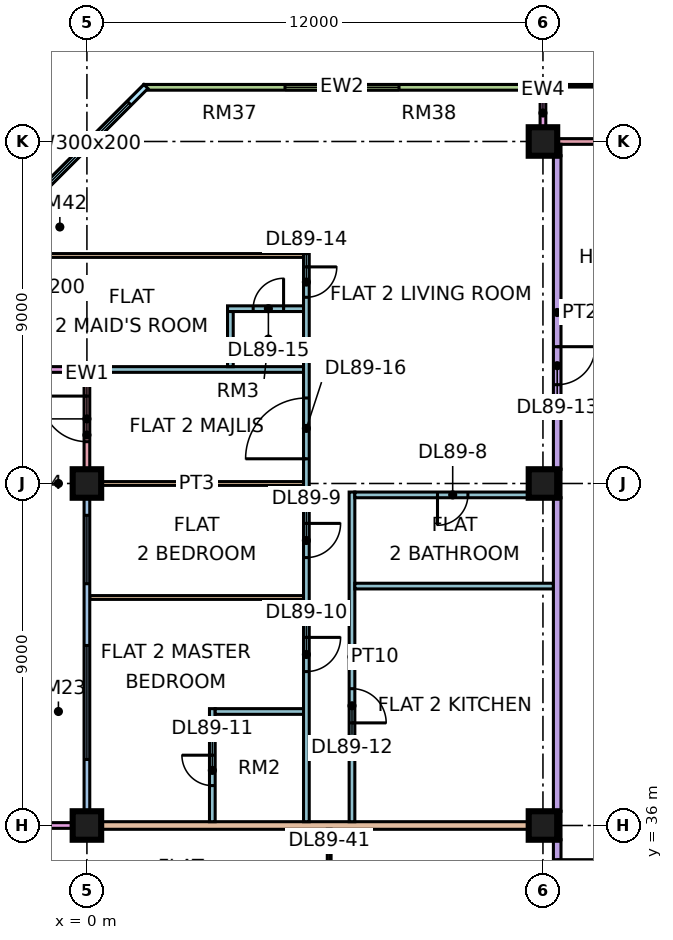
"""IFC4 building model, lengths in metres.
Left out: names, types, materials, properties, quantities, classifications, styles, units other than length and angle.
Written with IfcOpenShell. Run it as: python <this file> out.ifc"""

import sys

from ifc_helpers import new_model, si_unit, direction, frame, frame_2d, origin, origin_2d, place, context, subcontext, project, spatial, rectangle, extrude, element, fill, save


model = new_model("IFC4")
c1 = context("Model", 3, precision=1e-05, world=origin(), true_north=direction((0.0, 1.0)))
c2 = subcontext(c1, "Body", "Model", "MODEL_VIEW")
j1 = project(units=[si_unit("LENGTHUNIT", "METRE"), si_unit("PLANEANGLEUNIT", "RADIAN")], contexts=[c1])
p1 = place(None, origin())
s1 = spatial("IfcSite", under=j1, at=p1, CompositionType="ELEMENT")
p2 = place(p1, origin())
s2 = spatial("IfcBuilding", under=s1, at=p2, CompositionType="ELEMENT")
p3 = place(p2, frame((0.0, 0.0, 380.15)))
s3 = spatial("IfcBuildingStorey", under=s2, at=p3, CompositionType="ELEMENT", Elevation=380.15)
p4 = place(p3, frame((0.0, 36.0, 0.0), z_axis=(0.0, 0.0, 1.0), x_axis=(1.0, 0.0, 0.0)))
e1 = element("IfcColumn", 1, at=p4, inside=s3, PredefinedType="COLUMN", context=c2, shape_type="SweptSolid", body=[
    extrude(rectangle(XDim=0.75, YDim=0.75, at=origin_2d()), origin(), (0.0, 0.0, 1.0), 3.75),
])
for number, where, z_axis, x_axis in (
    (2, (0.0, 45.0, 0.0), (0.0, 0.0, 1.0), (1.0, 0.0, 0.0)),
    (3, (12.0, 36.0, 0.0), (0.0, 0.0, 1.0), (1.0, 0.0, 0.0)),
    (4, (12.0, 45.0, 0.0), (0.0, 0.0, 1.0), (1.0, 0.0, 0.0)),
    (5, (12.0, 54.0, 0.0), (0.0, 0.0, 1.0), (1.0, 0.0, 0.0)),
):
    element("IfcColumn", number, at=place(p3, frame(where, z_axis=z_axis, x_axis=x_axis)), inside=s3, PredefinedType="COLUMN", context=c2, shape_type="SweptSolid", body=[
        extrude(rectangle(XDim=0.75, YDim=0.75, at=origin_2d()), origin(), (0.0, 0.0, 1.0), 3.75),
    ])
p5 = place(p3, frame((22.425, 54.0, 0.0), z_axis=(0.0, 0.0, 1.0), x_axis=(-1.0, 0.0, 0.0)))
e6 = element("IfcWall", 6, at=p5, inside=s3, PredefinedType="SOLIDWALL", context=c2, shape_type="SweptSolid", body=[
    extrude(rectangle(XDim=10.35, YDim=0.15, at=frame_2d((5.175, 0.0))), origin(), (0.0, 0.0, 1.0), 3.3),
])
p6 = place(p5, frame((1.012, 0.0, 0.45)))
e7 = element("IfcOpeningElement", 7, at=p6, cuts=e6, PredefinedType="OPENING", context=c2, shape_type="SweptSolid", body=[
    extrude(rectangle(XDim=4.8, YDim=2.0, at=frame_2d((2.4, 1.0))), frame((0.0, 0.085, 0.0), z_axis=(0.0, -1.0, 0.0), x_axis=(1.0, 0.0, 0.0)), (0.0, 0.0, 1.0), 0.17),
])
p7 = place(p3, frame((12.0, 55.5, 0.0), z_axis=(0.0, 0.0, 1.0), x_axis=(0.0, -1.0, 0.0)))
e8 = element("IfcWall", 8, at=p7, inside=s3, PredefinedType="SOLIDWALL", context=c2, shape_type="SweptSolid", body=[
    extrude(rectangle(XDim=1.5, YDim=0.15, at=frame_2d((0.75, 0.0))), origin(), (0.0, 0.0, 1.0), 3.3),
])
p8 = place(p3, frame((11.925, 55.425, 0.0), z_axis=(0.0, 0.0, 1.0), x_axis=(-1.0, 0.0, 0.0)))
e9 = element("IfcWall", 9, at=p8, inside=s3, PredefinedType="SOLIDWALL", context=c2, shape_type="SweptSolid", body=[
    extrude(rectangle(XDim=10.425, YDim=0.15, at=frame_2d((5.212, 0.0))), origin(), (0.0, 0.0, 1.0), 3.3),
])
p9 = place(p8, frame((3.712, 0.0, 0.45)))
e10 = element("IfcOpeningElement", 10, at=p9, cuts=e9, PredefinedType="OPENING", context=c2, shape_type="SweptSolid", body=[
    extrude(rectangle(XDim=3.0, YDim=2.0, at=frame_2d((1.5, 1.0))), frame((0.0, 0.085, 0.0), z_axis=(0.0, -1.0, 0.0), x_axis=(1.0, 0.0, 0.0)), (0.0, 0.0, 1.0), 0.17),
])
p10 = place(p3, frame((1.553, 55.447, 0.0), z_axis=(0.0, 0.0, 1.0), x_axis=(-0.707106781187, -0.707106781187, 0.0)))
e11 = element("IfcWall", 11, at=p10, inside=s3, PredefinedType="SOLIDWALL", context=c2, shape_type="SweptSolid", body=[
    extrude(rectangle(XDim=4.243, YDim=0.15, at=frame_2d((2.121, 0.0))), origin(), (0.0, 0.0, 1.0), 3.3),
])
p11 = place(p10, frame((0.621, 0.0, 0.45)))
e12 = element("IfcOpeningElement", 12, at=p11, cuts=e11, PredefinedType="OPENING", context=c2, shape_type="SweptSolid", body=[
    extrude(rectangle(XDim=3.0, YDim=2.0, at=frame_2d((1.5, 1.0))), frame((0.0, 0.085, 0.0), z_axis=(0.0, -1.0, 0.0), x_axis=(1.0, 0.0, 0.0)), (0.0, 0.0, 1.0), 0.17),
])
for number, where, z_axis, x_axis in (
    (13, (-1.5, 48.0, 0.0), (0.0, 0.0, 1.0), (1.0, 0.0, 0.0)),
    (14, (-1.5, 36.0, 0.0), (0.0, 0.0, 1.0), (1.0, 0.0, 0.0)),
):
    element("IfcWall", number, at=place(p3, frame(where, z_axis=z_axis, x_axis=x_axis)), inside=s3, PredefinedType="SOLIDWALL", context=c2, shape_type="SweptSolid", body=[
        extrude(rectangle(XDim=1.5, YDim=0.15, at=frame_2d((0.75, 0.0))), origin(), (0.0, 0.0, 1.0), 3.3),
    ])
e15 = element("IfcWall", 15, at=p4, inside=s3, PredefinedType="PARTITIONING", context=c2, shape_type="SweptSolid", body=[
    extrude(rectangle(XDim=12.275, YDim=0.2, at=frame_2d((6.137, 0.0))), origin(), (0.0, 0.0, 1.0), 3.3),
])
p12 = place(p3, frame((0.0, 48.0, 0.0), z_axis=(0.0, 0.0, 1.0), x_axis=(1.0, 0.0, 0.0)))
e16 = element("IfcWall", 16, at=p12, inside=s3, PredefinedType="PARTITIONING", context=c2, shape_type="SweptSolid", body=[
    extrude(rectangle(XDim=5.7, YDim=0.15, at=frame_2d((2.85, 0.0))), origin(), (0.0, 0.0, 1.0), 3.3),
])
p13 = place(p3, frame((-1.35, 51.0, 0.0), z_axis=(0.0, 0.0, 1.0), x_axis=(1.0, 0.0, 0.0)))
e17 = element("IfcWall", 17, at=p13, inside=s3, PredefinedType="PARTITIONING", context=c2, shape_type="SweptSolid", body=[
    extrude(rectangle(XDim=7.05, YDim=0.1, at=frame_2d((3.525, 0.0))), origin(), (0.0, 0.0, 1.0), 3.3),
])
for number, where, z_axis, x_axis in (
    (18, (0.074, 42.0, 0.0), (0.0, 0.0, 1.0), (1.0, 0.0, 0.0)),
    (19, (0.074, 45.0, 0.0), (0.0, 0.0, 1.0), (1.0, 0.0, 0.0)),
):
    element("IfcWall", number, at=place(p3, frame(where, z_axis=z_axis, x_axis=x_axis)), inside=s3, PredefinedType="PARTITIONING", context=c2, shape_type="SweptSolid", body=[
        extrude(rectangle(XDim=5.626, YDim=0.1, at=frame_2d((2.813, 0.0))), origin(), (0.0, 0.0, 1.0), 3.3),
    ])
p14 = place(p3, frame((3.3, 36.1, 0.0), z_axis=(0.0, 0.0, 1.0), x_axis=(0.0, 1.0, 0.0)))
e20 = element("IfcWall", 20, at=p14, inside=s3, PredefinedType="PARTITIONING", context=c2, shape_type="SweptSolid", body=[
    extrude(rectangle(XDim=2.975, YDim=0.15, at=frame_2d((1.487, 0.0))), origin(), (0.0, 0.0, 1.0), 3.3),
])
p15 = place(p14, frame((0.95, 0.0, 0.0)))
e21 = element("IfcOpeningElement", 21, at=p15, cuts=e20, PredefinedType="OPENING", context=c2, shape_type="SweptSolid", body=[
    extrude(rectangle(XDim=0.8, YDim=2.1, at=frame_2d((0.4, 1.05))), frame((0.0, 0.085, 0.0), z_axis=(0.0, -1.0, 0.0), x_axis=(1.0, 0.0, 0.0)), (0.0, 0.0, 1.0), 0.17),
])
p16 = place(p3, frame((3.375, 39.0, 0.0), z_axis=(0.0, 0.0, 1.0), x_axis=(1.0, 0.0, 0.0)))
e22 = element("IfcWall", 22, at=p16, inside=s3, PredefinedType="PARTITIONING", context=c2, shape_type="SweptSolid", body=[
    extrude(rectangle(XDim=2.325, YDim=0.15, at=frame_2d((1.163, 0.0))), origin(), (0.0, 0.0, 1.0), 3.3),
])
p17 = place(p3, frame((3.7, 49.6, 0.0), z_axis=(0.0, 0.0, 1.0), x_axis=(1.0, 0.0, 0.0)))
e23 = element("IfcWall", 23, at=p17, inside=s3, PredefinedType="PARTITIONING", context=c2, shape_type="SweptSolid", body=[
    extrude(rectangle(XDim=2.0, YDim=0.15, at=frame_2d((1.0, 0.0))), origin(), (0.0, 0.0, 1.0), 3.3),
])
p18 = place(p17, frame((0.675, 0.0, 0.0)))
e24 = element("IfcOpeningElement", 24, at=p18, cuts=e23, PredefinedType="OPENING", context=c2, shape_type="SweptSolid", body=[
    extrude(rectangle(XDim=0.8, YDim=2.1, at=frame_2d((0.4, 1.05))), frame((0.0, 0.085, 0.0), z_axis=(0.0, -1.0, 0.0), x_axis=(1.0, 0.0, 0.0)), (0.0, 0.0, 1.0), 0.17),
])
p19 = place(p3, frame((3.775, 48.075, 0.0), z_axis=(0.0, 0.0, 1.0), x_axis=(0.0, 1.0, 0.0)))
e25 = element("IfcWall", 25, at=p19, inside=s3, PredefinedType="PARTITIONING", context=c2, shape_type="SweptSolid", body=[
    extrude(rectangle(XDim=1.45, YDim=0.15, at=frame_2d((0.725, 0.0))), origin(), (0.0, 0.0, 1.0), 3.3),
])
p20 = place(p3, frame((5.775, 36.1, 0.0), z_axis=(0.0, 0.0, 1.0), x_axis=(0.0, 1.0, 0.0)))
e26 = element("IfcWall", 26, at=p20, inside=s3, PredefinedType="PARTITIONING", context=c2, shape_type="SweptSolid", body=[
    extrude(rectangle(XDim=14.95, YDim=0.15, at=frame_2d((7.475, 0.0))), origin(), (0.0, 0.0, 1.0), 3.3),
])
p21 = place(p20, frame((6.95, 0.0, 0.0)))
e27 = element("IfcOpeningElement", 27, at=p21, cuts=e26, PredefinedType="OPENING", context=c2, shape_type="SweptSolid", body=[
    extrude(rectangle(XDim=0.9, YDim=2.1, at=frame_2d((0.45, 1.05))), frame((0.0, 0.085, 0.0), z_axis=(0.0, -1.0, 0.0), x_axis=(1.0, 0.0, 0.0)), (0.0, 0.0, 1.0), 0.17),
])
p22 = place(p20, frame((3.95, 0.0, 0.0)))
e28 = element("IfcOpeningElement", 28, at=p22, cuts=e26, PredefinedType="OPENING", context=c2, shape_type="SweptSolid", body=[
    extrude(rectangle(XDim=0.9, YDim=2.1, at=frame_2d((0.45, 1.05))), frame((0.0, 0.085, 0.0), z_axis=(0.0, -1.0, 0.0), x_axis=(1.0, 0.0, 0.0)), (0.0, 0.0, 1.0), 0.17),
])
p23 = place(p20, frame((13.8, 0.0, 0.0)))
e29 = element("IfcOpeningElement", 29, at=p23, cuts=e26, PredefinedType="OPENING", context=c2, shape_type="SweptSolid", body=[
    extrude(rectangle(XDim=0.8, YDim=2.1, at=frame_2d((0.4, 1.05))), frame((0.0, 0.085, 0.0), z_axis=(0.0, -1.0, 0.0), x_axis=(1.0, 0.0, 0.0)), (0.0, 0.0, 1.0), 0.17),
])
p24 = place(p20, frame((9.55, 0.0, 0.0)))
e30 = element("IfcOpeningElement", 30, at=p24, cuts=e26, PredefinedType="OPENING", context=c2, shape_type="SweptSolid", body=[
    extrude(rectangle(XDim=1.6, YDim=2.1, at=frame_2d((0.8, 1.05))), frame((0.0, 0.085, 0.0), z_axis=(0.0, -1.0, 0.0), x_axis=(1.0, 0.0, 0.0)), (0.0, 0.0, 1.0), 0.17),
])
p25 = place(p3, frame((6.375, 33.05, 0.0), z_axis=(0.0, 0.0, 1.0), x_axis=(0.0, 1.0, 0.0)))
e31 = element("IfcWall", 31, at=p25, inside=s3, PredefinedType="PARTITIONING", context=c2, shape_type="SweptSolid", body=[
    extrude(rectangle(XDim=2.85, YDim=0.1, at=frame_2d((1.425, 0.0))), origin(), (0.0, 0.0, 1.0), 3.3),
])
p26 = place(p25, frame((1.0, 0.0, 0.0)))
e32 = element("IfcOpeningElement", 32, at=p26, cuts=e31, PredefinedType="OPENING", context=c2, shape_type="SweptSolid", body=[
    extrude(rectangle(XDim=0.9, YDim=2.1, at=frame_2d((0.45, 1.05))), frame((0.0, 0.06, 0.0), z_axis=(0.0, -1.0, 0.0), x_axis=(1.0, 0.0, 0.0)), (0.0, 0.0, 1.0), 0.12),
])
p27 = place(p3, frame((6.975, 36.1, 0.0), z_axis=(0.0, 0.0, 1.0), x_axis=(0.0, 1.0, 0.0)))
e33 = element("IfcWall", 33, at=p27, inside=s3, PredefinedType="PARTITIONING", context=c2, shape_type="SweptSolid", body=[
    extrude(rectangle(XDim=8.675, YDim=0.15, at=frame_2d((4.337, 0.0))), origin(), (0.0, 0.0, 1.0), 3.3),
])
p28 = place(p27, frame((2.6, 0.0, 0.0)))
e34 = element("IfcOpeningElement", 34, at=p28, cuts=e33, PredefinedType="OPENING", context=c2, shape_type="SweptSolid", body=[
    extrude(rectangle(XDim=0.9, YDim=2.1, at=frame_2d((0.45, 1.05))), frame((0.0, 0.085, 0.0), z_axis=(0.0, -1.0, 0.0), x_axis=(1.0, 0.0, 0.0)), (0.0, 0.0, 1.0), 0.17),
])
p29 = place(p3, frame((7.05, 42.3, 0.0), z_axis=(0.0, 0.0, 1.0), x_axis=(1.0, 0.0, 0.0)))
e35 = element("IfcWall", 35, at=p29, inside=s3, PredefinedType="PARTITIONING", context=c2, shape_type="SweptSolid", body=[
    extrude(rectangle(XDim=5.225, YDim=0.15, at=frame_2d((2.612, 0.0))), origin(), (0.0, 0.0, 1.0), 3.3),
])
p30 = place(p3, frame((7.05, 44.7, 0.0), z_axis=(0.0, 0.0, 1.0), x_axis=(1.0, 0.0, 0.0)))
e36 = element("IfcWall", 36, at=p30, inside=s3, PredefinedType="PARTITIONING", context=c2, shape_type="SweptSolid", body=[
    extrude(rectangle(XDim=5.225, YDim=0.15, at=frame_2d((2.612, 0.0))), origin(), (0.0, 0.0, 1.0), 3.3),
])
p31 = place(p30, frame((2.175, 0.0, 0.0)))
e37 = element("IfcOpeningElement", 37, at=p31, cuts=e36, PredefinedType="OPENING", context=c2, shape_type="SweptSolid", body=[
    extrude(rectangle(XDim=0.8, YDim=2.1, at=frame_2d((0.4, 1.05))), frame((0.0, 0.085, 0.0), z_axis=(0.0, -1.0, 0.0), x_axis=(1.0, 0.0, 0.0)), (0.0, 0.0, 1.0), 0.17),
])
p32 = place(p3, frame((0.0, 47.925, 0.0), z_axis=(0.0, 0.0, 1.0), x_axis=(0.0, -1.0, 0.0)))
e38 = element("IfcWall", 38, at=p32, inside=s3, PredefinedType="SOLIDWALL", context=c2, shape_type="SweptSolid", body=[
    extrude(rectangle(XDim=3.3, YDim=0.15, at=frame_2d((1.65, 0.0))), origin(), (0.0, 0.0, 1.0), 3.3),
])
p33 = place(p32, frame((0.625, 0.0, 0.0)))
e39 = element("IfcOpeningElement", 39, at=p33, cuts=e38, PredefinedType="OPENING", context=c2, shape_type="SweptSolid", body=[
    extrude(rectangle(XDim=1.2, YDim=2.4, at=frame_2d((0.6, 1.2))), frame((0.0, 0.085, 0.0), z_axis=(0.0, -1.0, 0.0), x_axis=(1.0, 0.0, 0.0)), (0.0, 0.0, 1.0), 0.17),
])
p34 = place(p3, frame((0.0, 44.625, 0.0), z_axis=(0.0, 0.0, 1.0), x_axis=(0.0, -1.0, 0.0)))
e40 = element("IfcWall", 40, at=p34, inside=s3, PredefinedType="SOLIDWALL", context=c2, shape_type="SweptSolid", body=[
    extrude(rectangle(XDim=8.25, YDim=0.15, at=frame_2d((4.125, 0.0))), origin(), (0.0, 0.0, 1.0), 2.8),
])
p35 = place(p34, frame((0.462, 0.0, 0.45)))
e41 = element("IfcOpeningElement", 41, at=p35, cuts=e40, PredefinedType="OPENING", context=c2, shape_type="SweptSolid", body=[
    extrude(rectangle(XDim=1.8, YDim=2.0, at=frame_2d((0.9, 1.0))), frame((0.0, 0.085, 0.0), z_axis=(0.0, -1.0, 0.0), x_axis=(1.0, 0.0, 0.0)), (0.0, 0.0, 1.0), 0.17),
])
p36 = place(p34, frame((3.887, 0.0, 0.45)))
e42 = element("IfcOpeningElement", 42, at=p36, cuts=e40, PredefinedType="OPENING", context=c2, shape_type="SweptSolid", body=[
    extrude(rectangle(XDim=3.0, YDim=2.0, at=frame_2d((1.5, 1.0))), frame((0.0, 0.085, 0.0), z_axis=(0.0, -1.0, 0.0), x_axis=(1.0, 0.0, 0.0)), (0.0, 0.0, 1.0), 0.17),
])
p37 = place(p3, frame((0.0, 36.375, 0.0), z_axis=(0.0, 0.0, 1.0), x_axis=(0.0, -1.0, 0.0)))
e43 = element("IfcWall", 43, at=p37, inside=s3, PredefinedType="SOLIDWALL", context=c2, shape_type="SweptSolid", body=[
    extrude(rectangle(XDim=0.3, YDim=0.15, at=frame_2d((0.15, 0.0))), origin(), (0.0, 0.0, 1.0), 3.3),
])
p38 = place(p3, frame((12.375, 24.375, 0.0), z_axis=(0.0, 0.0, 1.0), x_axis=(0.0, 1.0, 0.0)))
e44 = element("IfcWall", 44, at=p38, inside=s3, PredefinedType="PARTITIONING", context=c2, shape_type="SweptSolid", body=[
    extrude(rectangle(XDim=11.25, YDim=0.2, at=frame_2d((5.625, 0.0))), origin(), (0.0, 0.0, 1.0), 2.8),
])
p39 = place(p38, frame((9.725, 0.0, 0.0)))
e45 = element("IfcOpeningElement", 45, at=p39, cuts=e44, PredefinedType="OPENING", context=c2, shape_type="SweptSolid", body=[
    extrude(rectangle(XDim=1.0, YDim=2.1, at=frame_2d((0.5, 1.05))), frame((0.0, 0.11, 0.0), z_axis=(0.0, -1.0, 0.0), x_axis=(1.0, 0.0, 0.0)), (0.0, 0.0, 1.0), 0.22),
])
p40 = place(p3, frame((12.375, 35.625, 0.0), z_axis=(0.0, 0.0, 1.0), x_axis=(0.0, 1.0, 0.0)))
e46 = element("IfcWall", 46, at=p40, inside=s3, PredefinedType="PARTITIONING", context=c2, shape_type="SweptSolid", body=[
    extrude(rectangle(XDim=0.75, YDim=0.2, at=frame_2d((0.375, 0.0))), origin(), (0.0, 0.0, 1.0), 3.3),
])
p41 = place(p3, frame((12.375, 36.375, 0.0), z_axis=(0.0, 0.0, 1.0), x_axis=(0.0, 1.0, 0.0)))
e47 = element("IfcWall", 47, at=p41, inside=s3, PredefinedType="PARTITIONING", context=c2, shape_type="SweptSolid", body=[
    extrude(rectangle(XDim=8.25, YDim=0.2, at=frame_2d((4.125, 0.0))), origin(), (0.0, 0.0, 1.0), 2.8),
])
p42 = place(p3, frame((12.375, 44.625, 0.0), z_axis=(0.0, 0.0, 1.0), x_axis=(0.0, 1.0, 0.0)))
e48 = element("IfcWall", 48, at=p42, inside=s3, PredefinedType="PARTITIONING", context=c2, shape_type="SweptSolid", body=[
    extrude(rectangle(XDim=0.75, YDim=0.2, at=frame_2d((0.375, 0.0))), origin(), (0.0, 0.0, 1.0), 3.3),
])
p43 = place(p3, frame((12.375, 45.375, 0.0), z_axis=(0.0, 0.0, 1.0), x_axis=(0.0, 1.0, 0.0)))
e49 = element("IfcWall", 49, at=p43, inside=s3, PredefinedType="PARTITIONING", context=c2, shape_type="SweptSolid", body=[
    extrude(rectangle(XDim=8.25, YDim=0.2, at=frame_2d((4.125, 0.0))), origin(), (0.0, 0.0, 1.0), 2.8),
])
p44 = place(p43, frame((2.225, 0.0, 0.0)))
e50 = element("IfcOpeningElement", 50, at=p44, cuts=e49, PredefinedType="OPENING", context=c2, shape_type="SweptSolid", body=[
    extrude(rectangle(XDim=1.0, YDim=2.1, at=frame_2d((0.5, 1.05))), frame((0.0, 0.11, 0.0), z_axis=(0.0, -1.0, 0.0), x_axis=(1.0, 0.0, 0.0)), (0.0, 0.0, 1.0), 0.22),
])
p45 = place(p3, frame((12.375, 53.625, 0.0), z_axis=(0.0, 0.0, 1.0), x_axis=(0.0, 1.0, 0.0)))
e51 = element("IfcWall", 51, at=p45, inside=s3, PredefinedType="PARTITIONING", context=c2, shape_type="SweptSolid", body=[
    extrude(rectangle(XDim=0.301, YDim=0.2, at=frame_2d((0.15, 0.0))), origin(), (0.0, 0.0, 1.0), 3.3),
])
p46 = place(p9, origin())
e52 = element("IfcWindow", 52, at=p46, inside=s3, PartitioningType="SINGLE_PANEL", PredefinedType="WINDOW", context=c2, shape_type="SweptSolid", body=[
    extrude(rectangle(XDim=3.0, YDim=2.0, at=frame_2d((1.5, 1.0))), frame((0.0, 0.03, 0.0), z_axis=(0.0, -1.0, 0.0), x_axis=(1.0, 0.0, 0.0)), (0.0, 0.0, 1.0), 0.06),
])
fill(e10, e52)
p47 = place(p11, origin())
e53 = element("IfcWindow", 53, at=p47, inside=s3, PartitioningType="SINGLE_PANEL", PredefinedType="WINDOW", context=c2, shape_type="SweptSolid", body=[
    extrude(rectangle(XDim=3.0, YDim=2.0, at=frame_2d((1.5, 1.0))), frame((0.0, 0.03, 0.0), z_axis=(0.0, -1.0, 0.0), x_axis=(1.0, 0.0, 0.0)), (0.0, 0.0, 1.0), 0.06),
])
fill(e12, e53)
p48 = place(p33, frame((1.2, 0.0, 0.0), z_axis=(0.0, 0.0, 1.0), x_axis=(-1.0, 0.0, 0.0)))
e54 = element("IfcDoor", 54, at=p48, inside=s3, OperationType="DOUBLE_DOOR_SINGLE_SWING", PredefinedType="DOOR", context=c2, shape_type="SweptSolid", body=[
    extrude(rectangle(XDim=1.2, YDim=2.4, at=frame_2d((0.6, 1.2))), frame((0.0, 0.025, 0.0), z_axis=(0.0, -1.0, 0.0), x_axis=(1.0, 0.0, 0.0)), (0.0, 0.0, 1.0), 0.05),
])
fill(e39, e54)
p49 = place(p35, origin())
e55 = element("IfcWindow", 55, at=p49, inside=s3, PartitioningType="SINGLE_PANEL", PredefinedType="WINDOW", context=c2, shape_type="SweptSolid", body=[
    extrude(rectangle(XDim=1.8, YDim=2.0, at=frame_2d((0.9, 1.0))), frame((0.0, 0.03, 0.0), z_axis=(0.0, -1.0, 0.0), x_axis=(1.0, 0.0, 0.0)), (0.0, 0.0, 1.0), 0.06),
])
fill(e41, e55)
p50 = place(p36, origin())
e56 = element("IfcWindow", 56, at=p50, inside=s3, PartitioningType="SINGLE_PANEL", PredefinedType="WINDOW", context=c2, shape_type="SweptSolid", body=[
    extrude(rectangle(XDim=3.0, YDim=2.0, at=frame_2d((1.5, 1.0))), frame((0.0, 0.03, 0.0), z_axis=(0.0, -1.0, 0.0), x_axis=(1.0, 0.0, 0.0)), (0.0, 0.0, 1.0), 0.06),
])
fill(e42, e56)
p51 = place(p31, frame((0.8, 0.0, 0.0), z_axis=(0.0, 0.0, 1.0), x_axis=(-1.0, 0.0, 0.0)))
e57 = element("IfcDoor", 57, at=p51, inside=s3, OperationType="SINGLE_SWING_LEFT", PredefinedType="DOOR", context=c2, shape_type="SweptSolid", body=[
    extrude(rectangle(XDim=0.8, YDim=2.1, at=frame_2d((0.4, 1.05))), frame((0.0, 0.025, 0.0), z_axis=(0.0, -1.0, 0.0), x_axis=(1.0, 0.0, 0.0)), (0.0, 0.0, 1.0), 0.05),
])
fill(e37, e57)
p52 = place(p21, origin())
e58 = element("IfcDoor", 58, at=p52, inside=s3, OperationType="SINGLE_SWING_RIGHT", PredefinedType="DOOR", context=c2, shape_type="SweptSolid", body=[
    extrude(rectangle(XDim=0.9, YDim=2.1, at=frame_2d((0.45, 1.05))), frame((0.0, 0.025, 0.0), z_axis=(0.0, -1.0, 0.0), x_axis=(1.0, 0.0, 0.0)), (0.0, 0.0, 1.0), 0.05),
])
fill(e27, e58)
p53 = place(p22, origin())
e59 = element("IfcDoor", 59, at=p53, inside=s3, OperationType="SINGLE_SWING_RIGHT", PredefinedType="DOOR", context=c2, shape_type="SweptSolid", body=[
    extrude(rectangle(XDim=0.9, YDim=2.1, at=frame_2d((0.45, 1.05))), frame((0.0, 0.025, 0.0), z_axis=(0.0, -1.0, 0.0), x_axis=(1.0, 0.0, 0.0)), (0.0, 0.0, 1.0), 0.05),
])
fill(e28, e59)
p54 = place(p15, frame((0.8, 0.0, 0.0), z_axis=(0.0, 0.0, 1.0), x_axis=(-1.0, 0.0, 0.0)))
e60 = element("IfcDoor", 60, at=p54, inside=s3, OperationType="SINGLE_SWING_RIGHT", PredefinedType="DOOR", context=c2, shape_type="SweptSolid", body=[
    extrude(rectangle(XDim=0.8, YDim=2.1, at=frame_2d((0.4, 1.05))), frame((0.0, 0.025, 0.0), z_axis=(0.0, -1.0, 0.0), x_axis=(1.0, 0.0, 0.0)), (0.0, 0.0, 1.0), 0.05),
])
fill(e21, e60)
p55 = place(p28, frame((0.9, 0.0, 0.0), z_axis=(0.0, 0.0, 1.0), x_axis=(-1.0, 0.0, 0.0)))
e61 = element("IfcDoor", 61, at=p55, inside=s3, OperationType="SINGLE_SWING_LEFT", PredefinedType="DOOR", context=c2, shape_type="SweptSolid", body=[
    extrude(rectangle(XDim=0.9, YDim=2.1, at=frame_2d((0.45, 1.05))), frame((0.0, 0.025, 0.0), z_axis=(0.0, -1.0, 0.0), x_axis=(1.0, 0.0, 0.0)), (0.0, 0.0, 1.0), 0.05),
])
fill(e34, e61)
p56 = place(p44, origin())
e62 = element("IfcDoor", 62, at=p56, inside=s3, OperationType="SINGLE_SWING_RIGHT", PredefinedType="DOOR", context=c2, shape_type="SweptSolid", body=[
    extrude(rectangle(XDim=1.0, YDim=2.1, at=frame_2d((0.5, 1.05))), frame((0.0, 0.025, 0.0), z_axis=(0.0, -1.0, 0.0), x_axis=(1.0, 0.0, 0.0)), (0.0, 0.0, 1.0), 0.05),
])
fill(e50, e62)
p57 = place(p23, origin())
e63 = element("IfcDoor", 63, at=p57, inside=s3, OperationType="SINGLE_SWING_RIGHT", PredefinedType="DOOR", context=c2, shape_type="SweptSolid", body=[
    extrude(rectangle(XDim=0.8, YDim=2.1, at=frame_2d((0.4, 1.05))), frame((0.0, 0.025, 0.0), z_axis=(0.0, -1.0, 0.0), x_axis=(1.0, 0.0, 0.0)), (0.0, 0.0, 1.0), 0.05),
])
fill(e29, e63)
p58 = place(p18, frame((0.8, 0.0, 0.0), z_axis=(0.0, 0.0, 1.0), x_axis=(-1.0, 0.0, 0.0)))
e64 = element("IfcDoor", 64, at=p58, inside=s3, OperationType="SINGLE_SWING_RIGHT", PredefinedType="DOOR", context=c2, shape_type="SweptSolid", body=[
    extrude(rectangle(XDim=0.8, YDim=2.1, at=frame_2d((0.4, 1.05))), frame((0.0, 0.025, 0.0), z_axis=(0.0, -1.0, 0.0), x_axis=(1.0, 0.0, 0.0)), (0.0, 0.0, 1.0), 0.05),
])
fill(e24, e64)
p59 = place(p24, origin())
e65 = element("IfcDoor", 65, at=p59, inside=s3, OperationType="DOUBLE_DOOR_SINGLE_SWING", PredefinedType="DOOR", context=c2, shape_type="SweptSolid", body=[
    extrude(rectangle(XDim=1.6, YDim=2.1, at=frame_2d((0.8, 1.05))), frame((0.0, 0.025, 0.0), z_axis=(0.0, -1.0, 0.0), x_axis=(1.0, 0.0, 0.0)), (0.0, 0.0, 1.0), 0.05),
])
fill(e30, e65)
p60 = place(p39, origin())
e66 = element("IfcDoor", 66, at=p60, inside=s3, OperationType="SINGLE_SWING_RIGHT", PredefinedType="DOOR", context=c2, shape_type="SweptSolid", body=[
    extrude(rectangle(XDim=1.0, YDim=2.1, at=frame_2d((0.5, 1.05))), frame((0.0, 0.025, 0.0), z_axis=(0.0, -1.0, 0.0), x_axis=(1.0, 0.0, 0.0)), (0.0, 0.0, 1.0), 0.05),
])
fill(e45, e66)
save(model, sys.argv[1])
